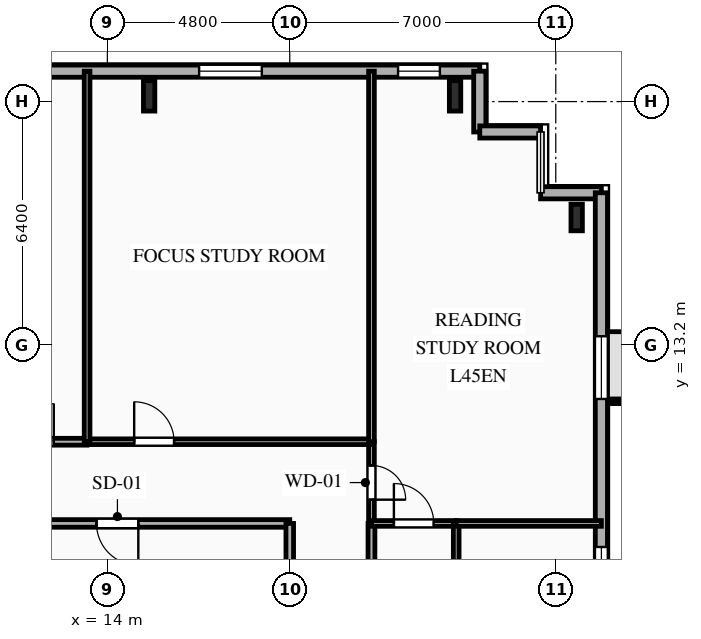
"""IFC4 building model, lengths in metres.
Left out: names, types, materials, properties, quantities, classifications, styles, units other than length and angle.
Written with IfcOpenShell. Run it as: python <this file> out.ifc"""

import sys

from ifc_helpers import new_model, si_unit, direction, frame, frame_2d, origin, origin_2d, place, context, subcontext, project, spatial, rectangle, i_section, extrude, element, fill, save


model = new_model("IFC4")
c1 = context("Model", 3, precision=1e-05, world=origin(), true_north=direction((0.0, 1.0)))
c2 = subcontext(c1, "Body", "Model", "MODEL_VIEW")
j1 = project(units=[si_unit("LENGTHUNIT", "METRE"), si_unit("PLANEANGLEUNIT", "RADIAN")], contexts=[c1])
p1 = place(None, origin())
s1 = spatial("IfcSite", under=j1, at=p1, CompositionType="ELEMENT")
p2 = place(p1, origin())
s2 = spatial("IfcBuilding", under=s1, at=p2, CompositionType="ELEMENT")
p3 = place(p2, frame((0.0, 0.0, 161.15)))
s3 = spatial("IfcBuildingStorey", under=s2, at=p3, CompositionType="ELEMENT", Elevation=161.15)
for number, where, z_axis, x_axis in (
    (1, (23.15, 19.75, 0.0), (0.0, 0.0, 1.0), (1.0, 0.0, 0.0)),
    (2, (15.1, 19.75, 0.0), (0.0, 0.0, 1.0), (1.0, 0.0, 0.0)),
):
    element("IfcColumn", number, at=place(p3, frame(where, z_axis=z_axis, x_axis=x_axis)), inside=s3, PredefinedType="COLUMN", context=c2, shape_type="SweptSolid", body=[
        extrude(i_section(OverallWidth=0.3, OverallDepth=0.8, WebThickness=0.018, FlangeThickness=0.033, FilletRadius=0.03, at=origin_2d()), origin(), (0.0, 0.0, 1.0), 3.35),
    ])
p4 = place(p3, frame((26.35, 16.55, 0.0), z_axis=(0.0, 0.0, 1.0), x_axis=(1.0, 0.0, 0.0)))
e3 = element("IfcColumn", 3, at=p4, inside=s3, PredefinedType="COLUMN", context=c2, shape_type="SweptSolid", body=[
    extrude(i_section(OverallWidth=0.3, OverallDepth=0.7, WebThickness=0.017, FlangeThickness=0.032, FilletRadius=0.027, at=origin_2d()), origin(), (0.0, 0.0, 1.0), 3.35),
])
p5 = place(p3, frame((-25.8, 20.4, 0.0), z_axis=(0.0, 0.0, 1.0), x_axis=(1.0, 0.0, 0.0)))
e4 = element("IfcWall", 4, at=p5, inside=s3, PredefinedType="SOLIDWALL", context=c2, shape_type="SweptSolid", body=[
    extrude(rectangle(XDim=49.6, YDim=0.32, at=frame_2d((24.8, 0.0))), origin(), (0.0, 0.0, 1.0), 3.04),
])
p6 = place(p5, frame((2.135, 0.0, 0.85)))
e5 = element("IfcOpeningElement", 5, at=p6, cuts=e4, PredefinedType="OPENING", context=c2, shape_type="SweptSolid", body=[
    extrude(rectangle(XDim=1.65, YDim=1.85, at=frame_2d((0.825, 0.925))), frame((0.0, 0.17, 0.0), z_axis=(0.0, -1.0, 0.0), x_axis=(1.0, 0.0, 0.0)), (0.0, 0.0, 1.0), 0.34),
])
p7 = place(p5, frame((6.706, 0.0, 0.85)))
e6 = element("IfcOpeningElement", 6, at=p7, cuts=e4, PredefinedType="OPENING", context=c2, shape_type="SweptSolid", body=[
    extrude(rectangle(XDim=1.65, YDim=1.85, at=frame_2d((0.825, 0.925))), frame((0.0, 0.17, 0.0), z_axis=(0.0, -1.0, 0.0), x_axis=(1.0, 0.0, 0.0)), (0.0, 0.0, 1.0), 0.34),
])
p8 = place(p5, frame((14.931, 0.0, 0.85)))
e7 = element("IfcOpeningElement", 7, at=p8, cuts=e4, PredefinedType="OPENING", context=c2, shape_type="SweptSolid", body=[
    extrude(rectangle(XDim=1.6, YDim=1.85, at=frame_2d((0.8, 0.925))), frame((0.0, 0.17, 0.0), z_axis=(0.0, -1.0, 0.0), x_axis=(1.0, 0.0, 0.0)), (0.0, 0.0, 1.0), 0.34),
])
p9 = place(p5, frame((20.74, 0.0, 0.85)))
e8 = element("IfcOpeningElement", 8, at=p9, cuts=e4, PredefinedType="OPENING", context=c2, shape_type="SweptSolid", body=[
    extrude(rectangle(XDim=2.2, YDim=1.85, at=frame_2d((1.1, 0.925))), frame((0.0, 0.17, 0.0), z_axis=(0.0, -1.0, 0.0), x_axis=(1.0, 0.0, 0.0)), (0.0, 0.0, 1.0), 0.34),
])
p10 = place(p5, frame((27.74, 0.0, 0.85)))
e9 = element("IfcOpeningElement", 9, at=p10, cuts=e4, PredefinedType="OPENING", context=c2, shape_type="SweptSolid", body=[
    extrude(rectangle(XDim=2.2, YDim=1.85, at=frame_2d((1.1, 0.925))), frame((0.0, 0.17, 0.0), z_axis=(0.0, -1.0, 0.0), x_axis=(1.0, 0.0, 0.0)), (0.0, 0.0, 1.0), 0.34),
])
p11 = place(p5, frame((34.7, 0.0, 0.85)))
e10 = element("IfcOpeningElement", 10, at=p11, cuts=e4, PredefinedType="OPENING", context=c2, shape_type="SweptSolid", body=[
    extrude(rectangle(XDim=2.2, YDim=1.85, at=frame_2d((1.1, 0.925))), frame((0.0, 0.17, 0.0), z_axis=(0.0, -1.0, 0.0), x_axis=(1.0, 0.0, 0.0)), (0.0, 0.0, 1.0), 0.34),
])
p12 = place(p5, frame((42.215, 0.0, 0.85)))
e11 = element("IfcOpeningElement", 11, at=p12, cuts=e4, PredefinedType="OPENING", context=c2, shape_type="SweptSolid", body=[
    extrude(rectangle(XDim=1.65, YDim=1.85, at=frame_2d((0.825, 0.925))), frame((0.0, 0.17, 0.0), z_axis=(0.0, -1.0, 0.0), x_axis=(1.0, 0.0, 0.0)), (0.0, 0.0, 1.0), 0.34),
])
p13 = place(p5, frame((47.45, 0.0, 0.85)))
e12 = element("IfcOpeningElement", 12, at=p13, cuts=e4, PredefinedType="OPENING", context=c2, shape_type="SweptSolid", body=[
    extrude(rectangle(XDim=1.1, YDim=1.85, at=frame_2d((0.55, 0.925))), frame((0.0, 0.17, 0.0), z_axis=(0.0, -1.0, 0.0), x_axis=(1.0, 0.0, 0.0)), (0.0, 0.0, 1.0), 0.34),
])
for number, where, z_axis, x_axis in (
    (13, (23.8, 20.4, 0.0), (0.0, 0.0, 1.0), (0.0, -1.0, 0.0)),
    (14, (23.8, 18.8, 0.0), (0.0, 0.0, 1.0), (1.0, 0.0, 0.0)),
):
    element("IfcWall", number, at=place(p3, frame(where, z_axis=z_axis, x_axis=x_axis)), inside=s3, PredefinedType="SOLIDWALL", context=c2, shape_type="SweptSolid", body=[
        extrude(rectangle(XDim=1.6, YDim=0.32, at=frame_2d((0.8, 0.0))), origin(), (0.0, 0.0, 1.0), 3.04),
    ])
p14 = place(p3, frame((25.4, 17.2, 0.0), z_axis=(0.0, 0.0, 1.0), x_axis=(1.0, 0.0, 0.0)))
e15 = element("IfcWall", 15, at=p14, inside=s3, PredefinedType="SOLIDWALL", context=c2, shape_type="SweptSolid", body=[
    extrude(rectangle(XDim=1.6, YDim=0.32, at=frame_2d((0.8, 0.0))), origin(), (0.0, 0.0, 1.0), 3.04),
])
p15 = place(p3, frame((27.0, 17.2, 0.0), z_axis=(0.0, 0.0, 1.0), x_axis=(0.0, -1.0, 0.0)))
e16 = element("IfcWall", 16, at=p15, inside=s3, PredefinedType="SOLIDWALL", context=c2, shape_type="SweptSolid", body=[
    extrude(rectangle(XDim=29.6, YDim=0.32, at=frame_2d((14.8, 0.0))), origin(), (0.0, 0.0, 1.0), 3.04),
])
p16 = place(p15, frame((3.775, 0.0, 0.85)))
e17 = element("IfcOpeningElement", 17, at=p16, cuts=e16, PredefinedType="OPENING", context=c2, shape_type="SweptSolid", body=[
    extrude(rectangle(XDim=1.65, YDim=1.85, at=frame_2d((0.825, 0.925))), frame((0.0, 0.17, 0.0), z_axis=(0.0, -1.0, 0.0), x_axis=(1.0, 0.0, 0.0)), (0.0, 0.0, 1.0), 0.34),
])
p17 = place(p15, frame((9.32, 0.0, 0.85)))
e18 = element("IfcOpeningElement", 18, at=p17, cuts=e16, PredefinedType="OPENING", context=c2, shape_type="SweptSolid", body=[
    extrude(rectangle(XDim=1.6, YDim=1.85, at=frame_2d((0.8, 0.925))), frame((0.0, 0.17, 0.0), z_axis=(0.0, -1.0, 0.0), x_axis=(1.0, 0.0, 0.0)), (0.0, 0.0, 1.0), 0.34),
])
p18 = place(p15, frame((12.2, 0.0, 0.85)))
e19 = element("IfcOpeningElement", 19, at=p18, cuts=e16, PredefinedType="OPENING", context=c2, shape_type="SweptSolid", body=[
    extrude(rectangle(XDim=1.6, YDim=1.85, at=frame_2d((0.8, 0.925))), frame((0.0, 0.17, 0.0), z_axis=(0.0, -1.0, 0.0), x_axis=(1.0, 0.0, 0.0)), (0.0, 0.0, 1.0), 0.34),
])
p19 = place(p15, frame((15.0, 0.0, 0.85)))
e20 = element("IfcOpeningElement", 20, at=p19, cuts=e16, PredefinedType="OPENING", context=c2, shape_type="SweptSolid", body=[
    extrude(rectangle(XDim=1.6, YDim=1.85, at=frame_2d((0.8, 0.925))), frame((0.0, 0.17, 0.0), z_axis=(0.0, -1.0, 0.0), x_axis=(1.0, 0.0, 0.0)), (0.0, 0.0, 1.0), 0.34),
])
p20 = place(p15, frame((17.865, 0.0, 0.85)))
e21 = element("IfcOpeningElement", 21, at=p20, cuts=e16, PredefinedType="OPENING", context=c2, shape_type="SweptSolid", body=[
    extrude(rectangle(XDim=1.95, YDim=1.85, at=frame_2d((0.975, 0.925))), frame((0.0, 0.17, 0.0), z_axis=(0.0, -1.0, 0.0), x_axis=(1.0, 0.0, 0.0)), (0.0, 0.0, 1.0), 0.34),
])
p21 = place(p15, frame((25.175, 0.0, 0.85)))
e22 = element("IfcOpeningElement", 22, at=p21, cuts=e16, PredefinedType="OPENING", context=c2, shape_type="SweptSolid", body=[
    extrude(rectangle(XDim=1.65, YDim=1.85, at=frame_2d((0.825, 0.925))), frame((0.0, 0.17, 0.0), z_axis=(0.0, -1.0, 0.0), x_axis=(1.0, 0.0, 0.0)), (0.0, 0.0, 1.0), 0.34),
])
p22 = place(p3, frame((18.8, 8.5, 0.0), z_axis=(0.0, 0.0, 1.0), x_axis=(-1.0, 0.0, 0.0)))
e23 = element("IfcWall", 23, at=p22, inside=s3, PredefinedType="PARTITIONING", context=c2, shape_type="SweptSolid", body=[
    extrude(rectangle(XDim=6.8, YDim=0.2, at=frame_2d((3.4, 0.0))), origin(), (0.0, 0.0, 1.0), 3.04),
])
p23 = place(p22, frame((3.985, 0.0, 0.0)))
e24 = element("IfcOpeningElement", 24, at=p23, cuts=e23, PredefinedType="OPENING", context=c2, shape_type="SweptSolid", body=[
    extrude(rectangle(XDim=1.1, YDim=2.15, at=frame_2d((0.55, 1.075))), frame((0.0, 0.11, 0.0), z_axis=(0.0, -1.0, 0.0), x_axis=(1.0, 0.0, 0.0)), (0.0, 0.0, 1.0), 0.22),
])
p24 = place(p3, frame((18.8, 5.6, 0.0), z_axis=(0.0, 0.0, 1.0), x_axis=(0.0, 1.0, 0.0)))
e25 = element("IfcWall", 25, at=p24, inside=s3, PredefinedType="PARTITIONING", context=c2, shape_type="SweptSolid", body=[
    extrude(rectangle(XDim=2.9, YDim=0.2, at=frame_2d((1.45, 0.0))), origin(), (0.0, 0.0, 1.0), 2.525),
])
p25 = place(p3, frame((20.95, 10.65, 0.0), z_axis=(0.0, 0.0, 1.0), x_axis=(0.0, -1.0, 0.0)))
e26 = element("IfcWall", 26, at=p25, inside=s3, PredefinedType="PARTITIONING", context=c2, shape_type="SweptSolid", body=[
    extrude(rectangle(XDim=2.15, YDim=0.15, at=frame_2d((1.075, 0.0))), origin(), (0.0, 0.0, 1.0), 3.04),
])
p26 = place(p25, frame((0.625, 0.0, 0.0)))
e27 = element("IfcOpeningElement", 27, at=p26, cuts=e26, PredefinedType="OPENING", context=c2, shape_type="SweptSolid", body=[
    extrude(rectangle(XDim=0.9, YDim=2.1, at=frame_2d((0.45, 1.05))), frame((0.0, 0.085, 0.0), z_axis=(0.0, -1.0, 0.0), x_axis=(1.0, 0.0, 0.0)), (0.0, 0.0, 1.0), 0.17),
])
p27 = place(p3, frame((8.933, 10.65, 0.0), z_axis=(0.0, 0.0, 1.0), x_axis=(1.0, 0.0, 0.0)))
e28 = element("IfcWall", 28, at=p27, inside=s3, PredefinedType="PARTITIONING", context=c2, shape_type="SweptSolid", body=[
    extrude(rectangle(XDim=4.534, YDim=0.18, at=frame_2d((2.267, 0.0))), origin(), (0.0, 0.0, 1.0), 3.04),
])
p28 = place(p27, frame((2.657, 0.0, 0.0)))
e29 = element("IfcOpeningElement", 29, at=p28, cuts=e28, PredefinedType="OPENING", context=c2, shape_type="SweptSolid", body=[
    extrude(rectangle(XDim=1.0, YDim=2.15, at=frame_2d((0.5, 1.075))), frame((0.0, 0.1, 0.0), z_axis=(0.0, -1.0, 0.0), x_axis=(1.0, 0.0, 0.0)), (0.0, 0.0, 1.0), 0.2),
])
p29 = place(p3, frame((13.467, 10.65, 0.0), z_axis=(0.0, 0.0, 1.0), x_axis=(1.0, 0.0, 0.0)))
e30 = element("IfcWall", 30, at=p29, inside=s3, PredefinedType="PARTITIONING", context=c2, shape_type="SweptSolid", body=[
    extrude(rectangle(XDim=7.483, YDim=0.15, at=frame_2d((3.741, 0.0))), origin(), (0.0, 0.0, 1.0), 3.04),
])
p30 = place(p29, frame((1.239, 0.0, 0.0)))
e31 = element("IfcOpeningElement", 31, at=p30, cuts=e30, PredefinedType="OPENING", context=c2, shape_type="SweptSolid", body=[
    extrude(rectangle(XDim=1.05, YDim=2.15, at=frame_2d((0.525, 1.075))), frame((0.0, 0.085, 0.0), z_axis=(0.0, -1.0, 0.0), x_axis=(1.0, 0.0, 0.0)), (0.0, 0.0, 1.0), 0.17),
])
p31 = place(p3, frame((20.95, 8.5, 0.0), z_axis=(0.0, 0.0, 1.0), x_axis=(0.0, -1.0, 0.0)))
e32 = element("IfcWall", 32, at=p31, inside=s3, PredefinedType="PARTITIONING", context=c2, shape_type="SweptSolid", body=[
    extrude(rectangle(XDim=14.1, YDim=0.18, at=frame_2d((7.05, 0.0))), origin(), (0.0, 0.0, 1.0), 3.04),
])
p32 = place(p31, frame((8.042, 0.0, 0.0)))
e33 = element("IfcOpeningElement", 33, at=p32, cuts=e32, PredefinedType="OPENING", context=c2, shape_type="SweptSolid", body=[
    extrude(rectangle(XDim=1.0, YDim=2.15, at=frame_2d((0.5, 1.075))), frame((0.0, 0.1, 0.0), z_axis=(0.0, -1.0, 0.0), x_axis=(1.0, 0.0, 0.0)), (0.0, 0.0, 1.0), 0.2),
])
p33 = place(p3, frame((20.95, 8.5, 0.0), z_axis=(0.0, 0.0, 1.0), x_axis=(1.0, 0.0, 0.0)))
e34 = element("IfcWall", 34, at=p33, inside=s3, PredefinedType="PARTITIONING", context=c2, shape_type="SweptSolid", body=[
    extrude(rectangle(XDim=2.23, YDim=0.15, at=frame_2d((1.115, 0.0))), origin(), (0.0, 0.0, 1.0), 3.04),
])
p34 = place(p33, frame((0.59, 0.0, 0.0)))
e35 = element("IfcOpeningElement", 35, at=p34, cuts=e34, PredefinedType="OPENING", context=c2, shape_type="SweptSolid", body=[
    extrude(rectangle(XDim=1.05, YDim=2.15, at=frame_2d((0.525, 1.075))), frame((0.0, 0.085, 0.0), z_axis=(0.0, -1.0, 0.0), x_axis=(1.0, 0.0, 0.0)), (0.0, 0.0, 1.0), 0.17),
])
p35 = place(p3, frame((23.18, 8.5, 0.0), z_axis=(0.0, 0.0, 1.0), x_axis=(0.0, -1.0, 0.0)))
e36 = element("IfcWall", 36, at=p35, inside=s3, PredefinedType="PARTITIONING", context=c2, shape_type="SweptSolid", body=[
    extrude(rectangle(XDim=2.82, YDim=0.15, at=frame_2d((1.41, 0.0))), origin(), (0.0, 0.0, 1.0), 3.04),
])
p36 = place(p35, frame((1.201, 0.0, 0.0)))
e37 = element("IfcOpeningElement", 37, at=p36, cuts=e36, PredefinedType="OPENING", context=c2, shape_type="SweptSolid", body=[
    extrude(rectangle(XDim=0.95, YDim=2.1, at=frame_2d((0.475, 1.05))), frame((0.0, 0.085, 0.0), z_axis=(0.0, -1.0, 0.0), x_axis=(1.0, 0.0, 0.0)), (0.0, 0.0, 1.0), 0.17),
])
p37 = place(p3, frame((27.0, 8.5, 0.0), z_axis=(0.0, 0.0, 1.0), x_axis=(-1.0, 0.0, 0.0)))
e38 = element("IfcWall", 38, at=p37, inside=s3, PredefinedType="PARTITIONING", context=c2, shape_type="SweptSolid", body=[
    extrude(rectangle(XDim=3.82, YDim=0.15, at=frame_2d((1.91, 0.0))), origin(), (0.0, 0.0, 1.0), 3.04),
])
p38 = place(p3, frame((20.95, 10.65, 0.0), z_axis=(0.0, 0.0, 1.0), x_axis=(0.0, 1.0, 0.0)))
e39 = element("IfcWall", 39, at=p38, inside=s3, PredefinedType="PARTITIONING", context=c2, shape_type="SweptSolid", body=[
    extrude(rectangle(XDim=9.75, YDim=0.15, at=frame_2d((4.875, 0.0))), origin(), (0.0, 0.0, 1.0), 2.525),
])
p39 = place(p3, frame((13.467, 20.4, 0.0), z_axis=(0.0, 0.0, 1.0), x_axis=(0.0, -1.0, 0.0)))
e40 = element("IfcWall", 40, at=p39, inside=s3, PredefinedType="PARTITIONING", context=c2, shape_type="SweptSolid", body=[
    extrude(rectangle(XDim=9.75, YDim=0.15, at=frame_2d((4.875, 0.0))), origin(), (0.0, 0.0, 1.0), 3.04),
])
p40 = place(p12, origin())
e41 = element("IfcWindow", 41, at=p40, inside=s3, PartitioningType="SINGLE_PANEL", PredefinedType="WINDOW", context=c2, shape_type="SweptSolid", body=[
    extrude(rectangle(XDim=1.65, YDim=1.85, at=frame_2d((0.825, 0.925))), frame((0.0, 0.03, 0.0), z_axis=(0.0, -1.0, 0.0), x_axis=(1.0, 0.0, 0.0)), (0.0, 0.0, 1.0), 0.06),
])
fill(e11, e41)
p41 = place(p13, origin())
e42 = element("IfcWindow", 42, at=p41, inside=s3, PartitioningType="SINGLE_PANEL", PredefinedType="WINDOW", context=c2, shape_type="SweptSolid", body=[
    extrude(rectangle(XDim=1.1, YDim=1.85, at=frame_2d((0.55, 0.925))), frame((0.0, 0.03, 0.0), z_axis=(0.0, -1.0, 0.0), x_axis=(1.0, 0.0, 0.0)), (0.0, 0.0, 1.0), 0.06),
])
fill(e12, e42)
p42 = place(p16, origin())
e43 = element("IfcWindow", 43, at=p42, inside=s3, PartitioningType="SINGLE_PANEL", PredefinedType="WINDOW", context=c2, shape_type="SweptSolid", body=[
    extrude(rectangle(XDim=1.65, YDim=1.85, at=frame_2d((0.825, 0.925))), frame((0.0, 0.03, 0.0), z_axis=(0.0, -1.0, 0.0), x_axis=(1.0, 0.0, 0.0)), (0.0, 0.0, 1.0), 0.06),
])
fill(e17, e43)
p43 = place(p17, origin())
e44 = element("IfcWindow", 44, at=p43, inside=s3, PartitioningType="SINGLE_PANEL", PredefinedType="WINDOW", context=c2, shape_type="SweptSolid", body=[
    extrude(rectangle(XDim=1.6, YDim=1.85, at=frame_2d((0.8, 0.925))), frame((0.0, 0.03, 0.0), z_axis=(0.0, -1.0, 0.0), x_axis=(1.0, 0.0, 0.0)), (0.0, 0.0, 1.0), 0.06),
])
fill(e18, e44)
p44 = place(p23, origin())
e45 = element("IfcDoor", 45, at=p44, inside=s3, OperationType="SINGLE_SWING_LEFT", PredefinedType="DOOR", context=c2, shape_type="SweptSolid", body=[
    extrude(rectangle(XDim=1.1, YDim=2.15, at=frame_2d((0.55, 1.075))), frame((0.0, 0.025, 0.0), z_axis=(0.0, -1.0, 0.0), x_axis=(1.0, 0.0, 0.0)), (0.0, 0.0, 1.0), 0.05),
])
fill(e24, e45)
p45 = place(p26, origin())
e46 = element("IfcDoor", 46, at=p45, inside=s3, OperationType="SINGLE_SWING_RIGHT", PredefinedType="DOOR", context=c2, shape_type="SweptSolid", body=[
    extrude(rectangle(XDim=0.9, YDim=2.1, at=frame_2d((0.45, 1.05))), frame((0.0, 0.025, 0.0), z_axis=(0.0, -1.0, 0.0), x_axis=(1.0, 0.0, 0.0)), (0.0, 0.0, 1.0), 0.05),
])
fill(e27, e46)
p46 = place(p28, origin())
e47 = element("IfcDoor", 47, at=p46, inside=s3, OperationType="SINGLE_SWING_RIGHT", PredefinedType="DOOR", context=c2, shape_type="SweptSolid", body=[
    extrude(rectangle(XDim=1.0, YDim=2.15, at=frame_2d((0.5, 1.075))), frame((0.0, 0.025, 0.0), z_axis=(0.0, -1.0, 0.0), x_axis=(1.0, 0.0, 0.0)), (0.0, 0.0, 1.0), 0.05),
])
fill(e29, e47)
p47 = place(p30, origin())
e48 = element("IfcDoor", 48, at=p47, inside=s3, OperationType="SINGLE_SWING_LEFT", PredefinedType="DOOR", context=c2, shape_type="SweptSolid", body=[
    extrude(rectangle(XDim=1.05, YDim=2.15, at=frame_2d((0.525, 1.075))), frame((0.0, 0.025, 0.0), z_axis=(0.0, -1.0, 0.0), x_axis=(1.0, 0.0, 0.0)), (0.0, 0.0, 1.0), 0.05),
])
fill(e31, e48)
p48 = place(p34, origin())
e49 = element("IfcDoor", 49, at=p48, inside=s3, OperationType="SINGLE_SWING_LEFT", PredefinedType="DOOR", context=c2, shape_type="SweptSolid", body=[
    extrude(rectangle(XDim=1.05, YDim=2.15, at=frame_2d((0.525, 1.075))), frame((0.0, 0.025, 0.0), z_axis=(0.0, -1.0, 0.0), x_axis=(1.0, 0.0, 0.0)), (0.0, 0.0, 1.0), 0.05),
])
fill(e35, e49)
save(model, sys.argv[1])
